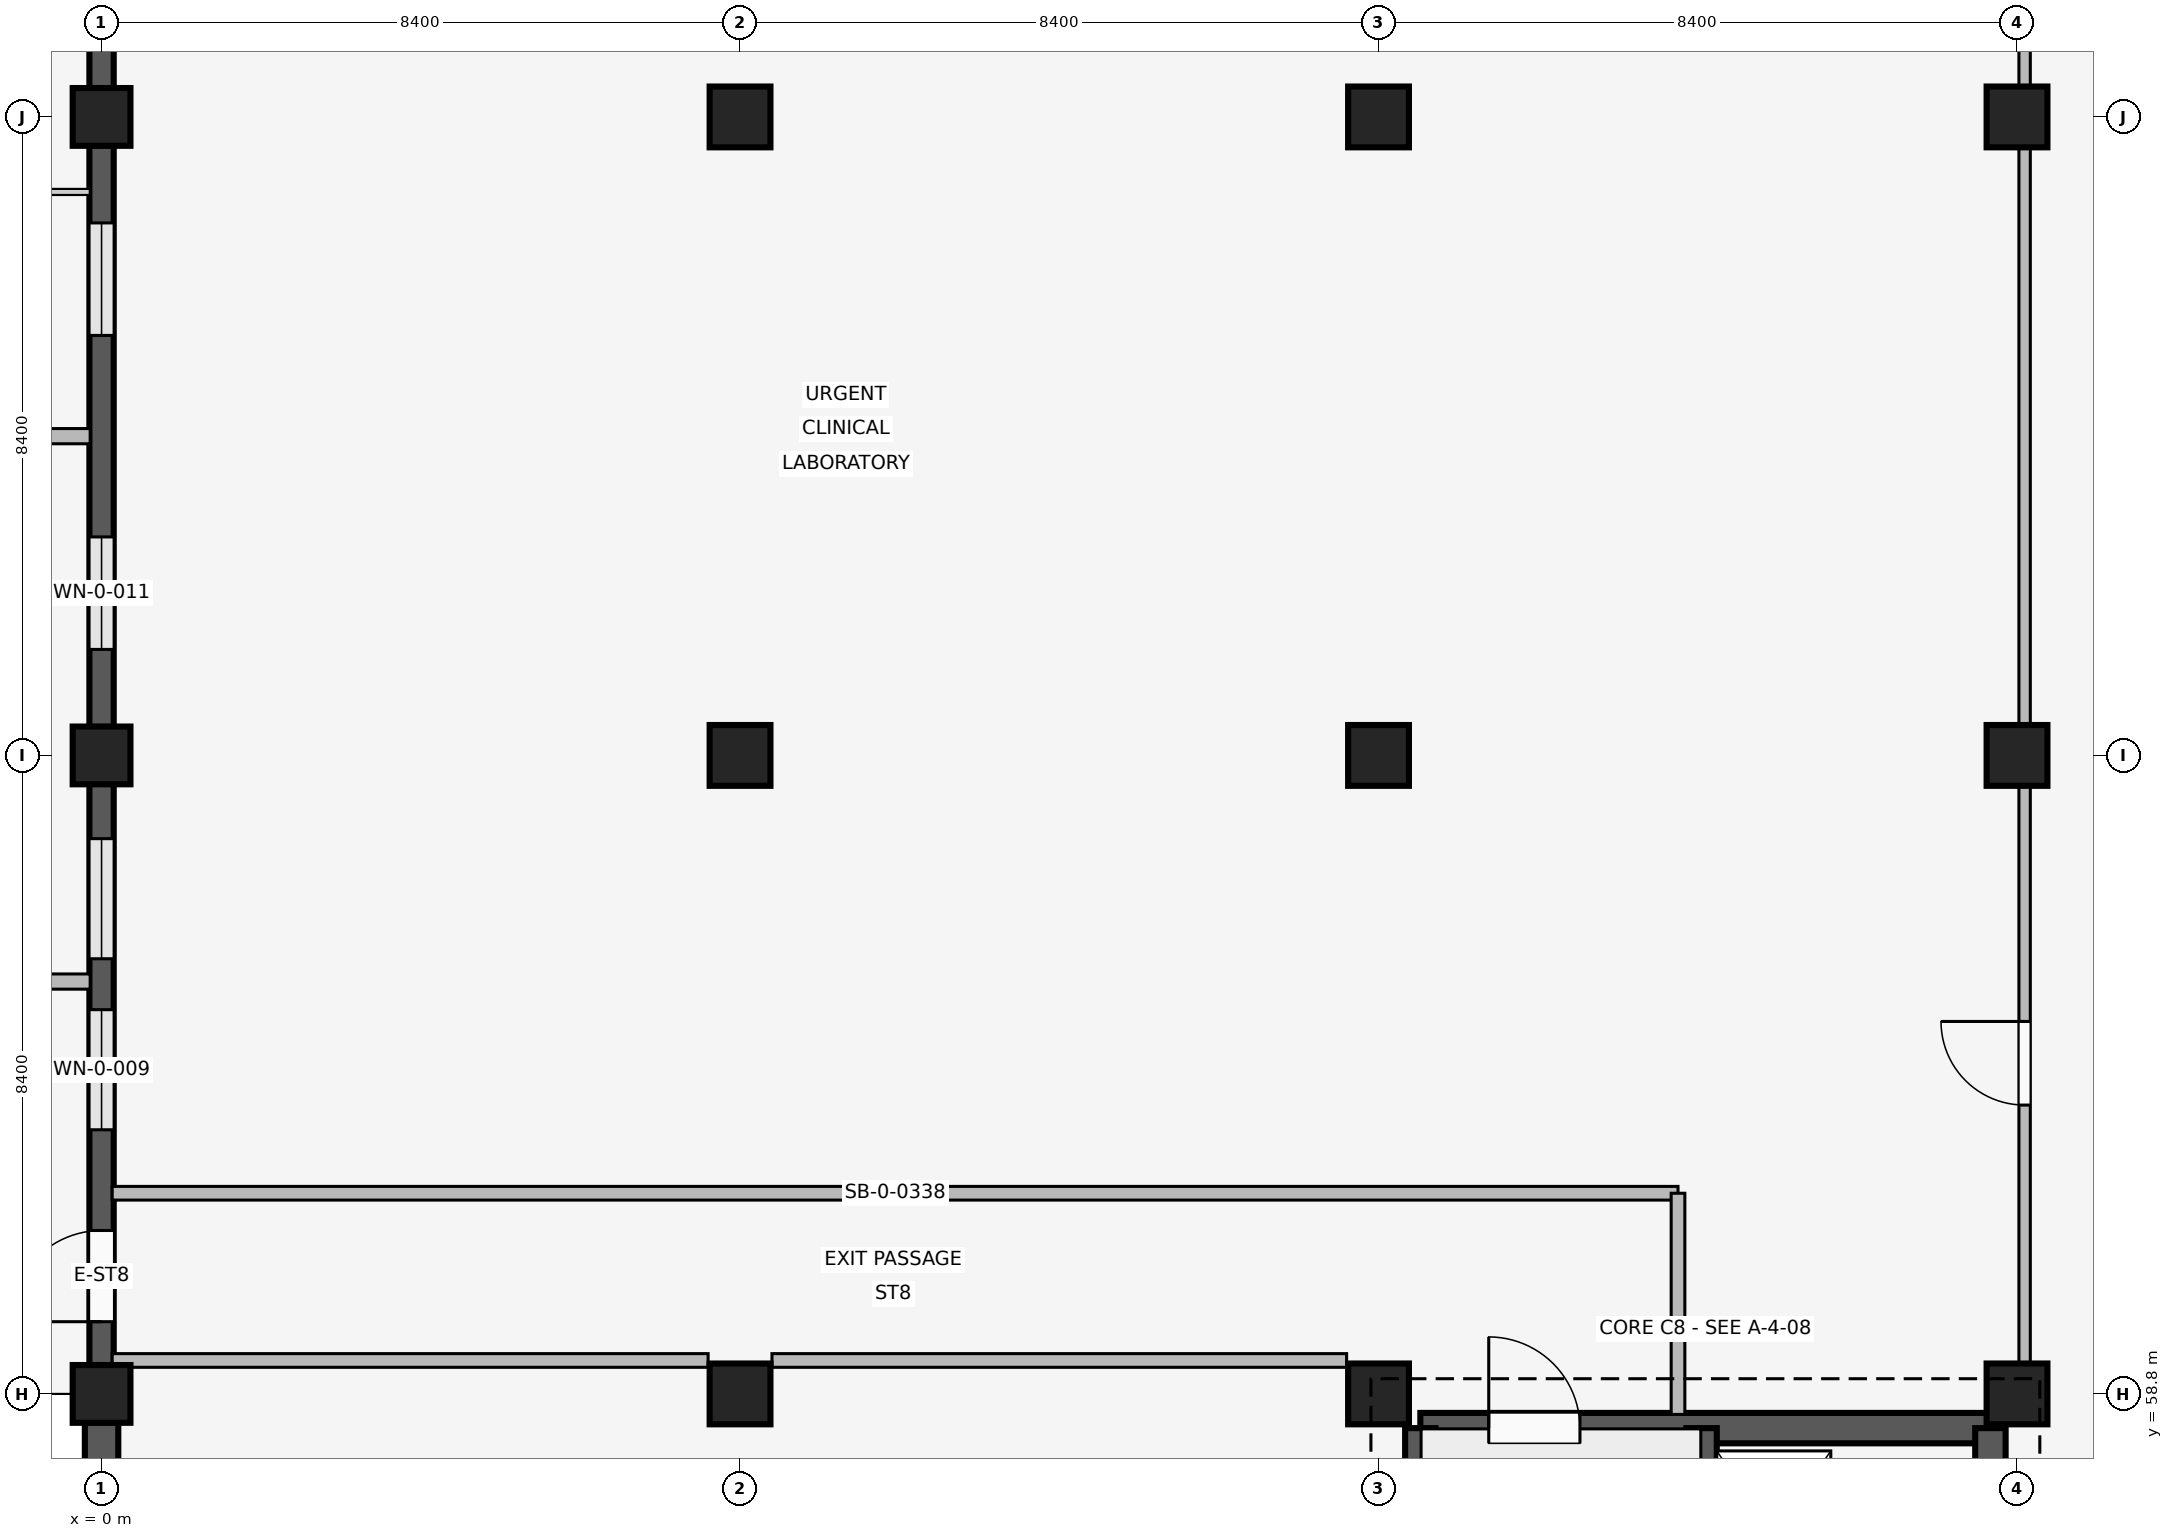
"""IFC4 building model, lengths in metres.
Left out: names, types, materials, properties, quantities, classifications, styles, units other than length and angle.
Written with IfcOpenShell. Run it as: python <this file> out.ifc"""

import sys

from ifc_helpers import new_model, si_unit, direction, frame, frame_2d, origin, origin_2d, place, context, subcontext, project, spatial, rectangle, extrude, element, fill, save


model = new_model("IFC4")
c1 = context("Model", 3, precision=1e-05, world=origin(), true_north=direction((0.0, 1.0)))
c2 = subcontext(c1, "Body", "Model", "MODEL_VIEW")
j1 = project(units=[si_unit("LENGTHUNIT", "METRE"), si_unit("PLANEANGLEUNIT", "RADIAN")], contexts=[c1])
p1 = place(None, origin())
s1 = spatial("IfcSite", under=j1, at=p1, CompositionType="ELEMENT")
p2 = place(p1, origin())
s2 = spatial("IfcBuilding", under=s1, at=p2, CompositionType="ELEMENT")
p3 = place(p2, origin())
s3 = spatial("IfcBuildingStorey", under=s2, at=p3, CompositionType="ELEMENT", Elevation=0.0)
for number, where, z_axis, x_axis in (
    (1, (0.0, 58.8, 0.0), (0.0, 0.0, 1.0), (1.0, 0.0, 0.0)),
    (2, (0.0, 67.2, 0.0), (0.0, 0.0, 1.0), (1.0, 0.0, 0.0)),
    (3, (0.0, 75.6, 0.0), (0.0, 0.0, 1.0), (1.0, 0.0, 0.0)),
):
    element("IfcColumn", number, at=place(p3, frame(where, z_axis=z_axis, x_axis=x_axis)), inside=s3, PredefinedType="COLUMN", context=c2, shape_type="SweptSolid", body=[
        extrude(rectangle(XDim=0.76, YDim=0.76, at=origin_2d()), origin(), (0.0, 0.0, 1.0), 4.8),
    ])
for number, where, z_axis, x_axis in (
    (4, (8.4, 58.8, 0.0), (0.0, 0.0, 1.0), (1.0, 0.0, 0.0)),
    (5, (8.4, 67.2, 0.0), (0.0, 0.0, 1.0), (1.0, 0.0, 0.0)),
    (6, (8.4, 75.6, 0.0), (0.0, 0.0, 1.0), (1.0, 0.0, 0.0)),
    (7, (16.8, 58.8, 0.0), (0.0, 0.0, 1.0), (1.0, 0.0, 0.0)),
    (8, (16.8, 67.2, 0.0), (0.0, 0.0, 1.0), (1.0, 0.0, 0.0)),
    (9, (16.8, 75.6, 0.0), (0.0, 0.0, 1.0), (1.0, 0.0, 0.0)),
    (10, (25.2, 58.8, 0.0), (0.0, 0.0, 1.0), (1.0, 0.0, 0.0)),
    (11, (25.2, 67.2, 0.0), (0.0, 0.0, 1.0), (1.0, 0.0, 0.0)),
    (12, (25.2, 75.6, 0.0), (0.0, 0.0, 1.0), (1.0, 0.0, 0.0)),
):
    element("IfcColumn", number, at=place(p3, frame(where, z_axis=z_axis, x_axis=x_axis)), inside=s3, PredefinedType="COLUMN", context=c2, shape_type="SweptSolid", body=[
        extrude(rectangle(XDim=0.8, YDim=0.8, at=origin_2d()), origin(), (0.0, 0.0, 1.0), 4.8),
    ])
p4 = place(p3, frame((0.0, 50.775, 0.0), z_axis=(0.0, 0.0, 1.0), x_axis=(0.0, 1.0, 0.0)))
e13 = element("IfcWall", 13, at=p4, inside=s3, PredefinedType="SOLIDWALL", context=c2, shape_type="SweptSolid", body=[
    extrude(rectangle(XDim=7.65, YDim=0.44, at=frame_2d((3.825, 0.0))), origin(), (0.0, 0.0, 1.0), 3.82),
])
p5 = place(p3, frame((0.0, 59.175, 0.0), z_axis=(0.0, 0.0, 1.0), x_axis=(0.0, 1.0, 0.0)))
e14 = element("IfcWall", 14, at=p5, inside=s3, PredefinedType="SOLIDWALL", context=c2, shape_type="SweptSolid", body=[
    extrude(rectangle(XDim=7.65, YDim=0.32, at=frame_2d((3.825, 0.0))), origin(), (0.0, 0.0, 1.0), 3.82),
])
p6 = place(p5, frame((0.575, 0.0, 0.0)))
e15 = element("IfcOpeningElement", 15, at=p6, cuts=e14, PredefinedType="OPENING", context=c2, shape_type="SweptSolid", body=[
    extrude(rectangle(XDim=1.2, YDim=2.25, at=frame_2d((0.6, 1.125))), frame((0.0, 0.17, 0.0), z_axis=(0.0, -1.0, 0.0), x_axis=(1.0, 0.0, 0.0)), (0.0, 0.0, 1.0), 0.34),
])
p7 = place(p5, frame((3.1, 0.0, 0.85)))
e16 = element("IfcOpeningElement", 16, at=p7, cuts=e14, PredefinedType="OPENING", context=c2, shape_type="SweptSolid", body=[
    extrude(rectangle(XDim=1.58, YDim=1.7, at=frame_2d((0.79, 0.85))), frame((0.0, 0.17, 0.0), z_axis=(0.0, -1.0, 0.0), x_axis=(1.0, 0.0, 0.0)), (0.0, 0.0, 1.0), 0.34),
])
p8 = place(p5, frame((5.35, 0.0, 0.85)))
e17 = element("IfcOpeningElement", 17, at=p8, cuts=e14, PredefinedType="OPENING", context=c2, shape_type="SweptSolid", body=[
    extrude(rectangle(XDim=1.58, YDim=1.7, at=frame_2d((0.79, 0.85))), frame((0.0, 0.17, 0.0), z_axis=(0.0, -1.0, 0.0), x_axis=(1.0, 0.0, 0.0)), (0.0, 0.0, 1.0), 0.34),
])
p9 = place(p3, frame((-0.15, 64.225, 0.0), z_axis=(0.0, 0.0, 1.0), x_axis=(-1.0, 0.0, 0.0)))
e18 = element("IfcWall", 18, at=p9, inside=s3, PredefinedType="ELEMENTEDWALL", context=c2, shape_type="SweptSolid", body=[
    extrude(rectangle(XDim=0.85, YDim=0.2, at=frame_2d((0.425, 0.0))), origin(), (0.0, 0.0, 1.0), 3.8),
])
p10 = place(p3, frame((0.0, 67.575, 0.0), z_axis=(0.0, 0.0, 1.0), x_axis=(0.0, 1.0, 0.0)))
e19 = element("IfcWall", 19, at=p10, inside=s3, PredefinedType="SOLIDWALL", context=c2, shape_type="SweptSolid", body=[
    extrude(rectangle(XDim=7.65, YDim=0.32, at=frame_2d((3.825, 0.0))), origin(), (0.0, 0.0, 1.0), 3.82),
])
p11 = place(p10, frame((1.02, 0.0, 0.85)))
e20 = element("IfcOpeningElement", 20, at=p11, cuts=e19, PredefinedType="OPENING", context=c2, shape_type="SweptSolid", body=[
    extrude(rectangle(XDim=1.48, YDim=1.6, at=frame_2d((0.74, 0.8))), frame((0.0, 0.17, 0.0), z_axis=(0.0, -1.0, 0.0), x_axis=(1.0, 0.0, 0.0)), (0.0, 0.0, 1.0), 0.34),
])
p12 = place(p10, frame((5.15, 0.0, 0.85)))
e21 = element("IfcOpeningElement", 21, at=p12, cuts=e19, PredefinedType="OPENING", context=c2, shape_type="SweptSolid", body=[
    extrude(rectangle(XDim=1.48, YDim=1.6, at=frame_2d((0.74, 0.8))), frame((0.0, 0.17, 0.0), z_axis=(0.0, -1.0, 0.0), x_axis=(1.0, 0.0, 0.0)), (0.0, 0.0, 1.0), 0.34),
])
p13 = place(p3, frame((-0.15, 71.4, 0.0), z_axis=(0.0, 0.0, 1.0), x_axis=(-1.0, 0.0, 0.0)))
e22 = element("IfcWall", 22, at=p13, inside=s3, PredefinedType="ELEMENTEDWALL", context=c2, shape_type="SweptSolid", body=[
    extrude(rectangle(XDim=0.85, YDim=0.2, at=frame_2d((0.425, 0.0))), origin(), (0.0, 0.0, 1.0), 3.8),
])
p14 = place(p3, frame((0.0, 75.975, 0.0), z_axis=(0.0, 0.0, 1.0), x_axis=(0.0, 1.0, 0.0)))
e23 = element("IfcWall", 23, at=p14, inside=s3, PredefinedType="SOLIDWALL", context=c2, shape_type="SweptSolid", body=[
    extrude(rectangle(XDim=7.65, YDim=0.32, at=frame_2d((3.825, 0.0))), origin(), (0.0, 0.0, 1.0), 3.82),
])
p15 = place(p14, frame((1.05, 0.0, 0.85)))
e24 = element("IfcOpeningElement", 24, at=p15, cuts=e23, PredefinedType="OPENING", context=c2, shape_type="SweptSolid", body=[
    extrude(rectangle(XDim=1.42, YDim=1.45, at=frame_2d((0.71, 0.725))), frame((0.0, 0.17, 0.0), z_axis=(0.0, -1.0, 0.0), x_axis=(1.0, 0.0, 0.0)), (0.0, 0.0, 1.0), 0.34),
])
p16 = place(p14, frame((5.18, 0.0, 0.85)))
e25 = element("IfcOpeningElement", 25, at=p16, cuts=e23, PredefinedType="OPENING", context=c2, shape_type="SweptSolid", body=[
    extrude(rectangle(XDim=1.42, YDim=1.45, at=frame_2d((0.71, 0.725))), frame((0.0, 0.17, 0.0), z_axis=(0.0, -1.0, 0.0), x_axis=(1.0, 0.0, 0.0)), (0.0, 0.0, 1.0), 0.34),
])
p17 = place(p3, frame((17.35, 58.35, 0.0), z_axis=(0.0, 0.0, 1.0), x_axis=(1.0, 0.0, 0.0)))
e26 = element("IfcWall", 26, at=p17, inside=s3, PredefinedType="SHEAR", context=c2, shape_type="SweptSolid", body=[
    extrude(rectangle(XDim=7.5, YDim=0.4, at=frame_2d((3.75, 0.0))), origin(), (0.0, 0.0, 1.0), 4.64),
])
p18 = place(p17, frame((0.9, 0.0, 0.0)))
e27 = element("IfcOpeningElement", 27, at=p18, cuts=e26, PredefinedType="OPENING", context=c2, shape_type="SweptSolid", body=[
    extrude(rectangle(XDim=1.2, YDim=2.1, at=frame_2d((0.6, 1.05))), frame((0.0, 0.21, 0.0), z_axis=(0.0, -1.0, 0.0), x_axis=(1.0, 0.0, 0.0)), (0.0, 0.0, 1.0), 0.42),
])
p19 = place(p3, frame((17.35, 50.8, 0.0), z_axis=(0.0, 0.0, 1.0), x_axis=(0.0, 1.0, 0.0)))
e28 = element("IfcWall", 28, at=p19, inside=s3, PredefinedType="SHEAR", context=c2, shape_type="SweptSolid", body=[
    extrude(rectangle(XDim=7.55, YDim=0.4, at=frame_2d((3.775, 0.0))), origin(), (0.0, 0.0, 1.0), 4.64),
])
p20 = place(p3, frame((24.85, 50.8, 0.0), z_axis=(0.0, 0.0, 1.0), x_axis=(0.0, 1.0, 0.0)))
e29 = element("IfcWall", 29, at=p20, inside=s3, PredefinedType="SHEAR", context=c2, shape_type="SweptSolid", body=[
    extrude(rectangle(XDim=7.55, YDim=0.4, at=frame_2d((3.775, 0.0))), origin(), (0.0, 0.0, 1.0), 4.64),
])
p21 = place(p20, frame((2.4, 0.0, 0.0)))
e30 = element("IfcOpeningElement", 30, at=p21, cuts=e29, PredefinedType="OPENING", context=c2, shape_type="SweptSolid", body=[
    extrude(rectangle(XDim=1.2, YDim=2.2, at=frame_2d((0.6, 1.1))), frame((0.0, 0.21, 0.0), z_axis=(0.0, -1.0, 0.0), x_axis=(1.0, 0.0, 0.0)), (0.0, 0.0, 1.0), 0.42),
])
p22 = place(p3, frame((21.05, 50.8, 0.0), z_axis=(0.0, 0.0, 1.0), x_axis=(0.0, 1.0, 0.0)))
e31 = element("IfcWall", 31, at=p22, inside=s3, PredefinedType="SHEAR", context=c2, shape_type="SweptSolid", body=[
    extrude(rectangle(XDim=7.55, YDim=0.4, at=frame_2d((3.775, 0.0))), origin(), (0.0, 0.0, 1.0), 4.64),
])
p23 = place(p22, frame((0.28, 0.0, 0.0)))
e32 = element("IfcOpeningElement", 32, at=p23, cuts=e31, PredefinedType="OPENING", context=c2, shape_type="SweptSolid", body=[
    extrude(rectangle(XDim=1.0, YDim=2.15, at=frame_2d((0.5, 1.075))), frame((0.0, 0.21, 0.0), z_axis=(0.0, -1.0, 0.0), x_axis=(1.0, 0.0, 0.0)), (0.0, 0.0, 1.0), 0.42),
])
p24 = place(p3, frame((25.3, 59.2, 0.0), z_axis=(0.0, 0.0, 1.0), x_axis=(0.0, 1.0, 0.0)))
e33 = element("IfcWall", 33, at=p24, inside=s3, PredefinedType="PARTITIONING", context=c2, shape_type="SweptSolid", body=[
    extrude(rectangle(XDim=16.0, YDim=0.15, at=frame_2d((8.0, 0.0))), origin(), (0.0, 0.0, 1.0), 3.8),
])
p25 = place(p24, frame((3.4, 0.0, 0.0)))
e34 = element("IfcOpeningElement", 34, at=p25, cuts=e33, PredefinedType="OPENING", context=c2, shape_type="SweptSolid", body=[
    extrude(rectangle(XDim=1.1, YDim=2.2, at=frame_2d((0.55, 1.1))), frame((0.0, 0.085, 0.0), z_axis=(0.0, -1.0, 0.0), x_axis=(1.0, 0.0, 0.0)), (0.0, 0.0, 1.0), 0.17),
])
p26 = place(p3, frame((25.3, 76.0, 0.0), z_axis=(0.0, 0.0, 1.0), x_axis=(0.0, 1.0, 0.0)))
e35 = element("IfcWall", 35, at=p26, inside=s3, PredefinedType="PARTITIONING", context=c2, shape_type="SweptSolid", body=[
    extrude(rectangle(XDim=16.0, YDim=0.15, at=frame_2d((8.0, 0.0))), origin(), (0.0, 0.0, 1.0), 3.8),
])
p27 = place(p26, frame((3.4, 0.0, 0.0)))
e36 = element("IfcOpeningElement", 36, at=p27, cuts=e35, PredefinedType="OPENING", context=c2, shape_type="SweptSolid", body=[
    extrude(rectangle(XDim=1.08, YDim=2.15, at=frame_2d((0.54, 1.075))), frame((0.0, 0.085, 0.0), z_axis=(0.0, -1.0, 0.0), x_axis=(1.0, 0.0, 0.0)), (0.0, 0.0, 1.0), 0.17),
])
p28 = place(p3, frame((0.14, 61.44, 0.0), z_axis=(0.0, 0.0, 1.0), x_axis=(1.0, 0.0, 0.0)))
e37 = element("IfcWall", 37, at=p28, inside=s3, PredefinedType="PARTITIONING", context=c2, shape_type="SweptSolid", body=[
    extrude(rectangle(XDim=20.6, YDim=0.18, at=frame_2d((10.3, 0.0))), origin(), (0.0, 0.0, 1.0), 3.8),
])
p29 = place(p3, frame((20.74, 58.53, 0.0), z_axis=(0.0, 0.0, 1.0), x_axis=(0.0, 1.0, 0.0)))
e38 = element("IfcWall", 38, at=p29, inside=s3, PredefinedType="PARTITIONING", context=c2, shape_type="SweptSolid", body=[
    extrude(rectangle(XDim=2.91, YDim=0.18, at=frame_2d((1.455, 0.0))), origin(), (0.0, 0.0, 1.0), 3.8),
])
p30 = place(p3, frame((0.14, 59.24, 0.0), z_axis=(0.0, 0.0, 1.0), x_axis=(1.0, 0.0, 0.0)))
e39 = element("IfcWall", 39, at=p30, inside=s3, PredefinedType="PARTITIONING", context=c2, shape_type="SweptSolid", body=[
    extrude(rectangle(XDim=7.84, YDim=0.18, at=frame_2d((3.92, 0.0))), origin(), (0.0, 0.0, 1.0), 3.8),
])
p31 = place(p3, frame((8.82, 59.24, 0.0), z_axis=(0.0, 0.0, 1.0), x_axis=(1.0, 0.0, 0.0)))
e40 = element("IfcWall", 40, at=p31, inside=s3, PredefinedType="PARTITIONING", context=c2, shape_type="SweptSolid", body=[
    extrude(rectangle(XDim=7.56, YDim=0.18, at=frame_2d((3.78, 0.0))), origin(), (0.0, 0.0, 1.0), 3.8),
])
p32 = place(p6, origin())
e41 = element("IfcDoor", 41, at=p32, inside=s3, OperationType="SINGLE_SWING_LEFT", PredefinedType="DOOR", context=c2, shape_type="SweptSolid", body=[
    extrude(rectangle(XDim=1.2, YDim=2.25, at=frame_2d((0.6, 1.125))), frame((0.0, 0.025, 0.0), z_axis=(0.0, -1.0, 0.0), x_axis=(1.0, 0.0, 0.0)), (0.0, 0.0, 1.0), 0.05),
])
fill(e15, e41)
p33 = place(p7, origin())
e42 = element("IfcWindow", 42, at=p33, inside=s3, PartitioningType="SINGLE_PANEL", PredefinedType="WINDOW", context=c2, shape_type="SweptSolid", body=[
    extrude(rectangle(XDim=1.58, YDim=1.7, at=frame_2d((0.79, 0.85))), frame((0.0, 0.03, 0.0), z_axis=(0.0, -1.0, 0.0), x_axis=(1.0, 0.0, 0.0)), (0.0, 0.0, 1.0), 0.06),
])
fill(e16, e42)
p34 = place(p8, origin())
e43 = element("IfcWindow", 43, at=p34, inside=s3, PartitioningType="SINGLE_PANEL", PredefinedType="WINDOW", context=c2, shape_type="SweptSolid", body=[
    extrude(rectangle(XDim=1.58, YDim=1.7, at=frame_2d((0.79, 0.85))), frame((0.0, 0.03, 0.0), z_axis=(0.0, -1.0, 0.0), x_axis=(1.0, 0.0, 0.0)), (0.0, 0.0, 1.0), 0.06),
])
fill(e17, e43)
p35 = place(p11, origin())
e44 = element("IfcWindow", 44, at=p35, inside=s3, PartitioningType="SINGLE_PANEL", PredefinedType="WINDOW", context=c2, shape_type="SweptSolid", body=[
    extrude(rectangle(XDim=1.48, YDim=1.6, at=frame_2d((0.74, 0.8))), frame((0.0, 0.03, 0.0), z_axis=(0.0, -1.0, 0.0), x_axis=(1.0, 0.0, 0.0)), (0.0, 0.0, 1.0), 0.06),
])
fill(e20, e44)
p36 = place(p12, origin())
e45 = element("IfcWindow", 45, at=p36, inside=s3, PartitioningType="SINGLE_PANEL", PredefinedType="WINDOW", context=c2, shape_type="SweptSolid", body=[
    extrude(rectangle(XDim=1.48, YDim=1.6, at=frame_2d((0.74, 0.8))), frame((0.0, 0.03, 0.0), z_axis=(0.0, -1.0, 0.0), x_axis=(1.0, 0.0, 0.0)), (0.0, 0.0, 1.0), 0.06),
])
fill(e21, e45)
p37 = place(p18, origin())
e46 = element("IfcDoor", 46, at=p37, inside=s3, OperationType="SINGLE_SWING_LEFT", PredefinedType="DOOR", context=c2, shape_type="SweptSolid", body=[
    extrude(rectangle(XDim=1.2, YDim=2.1, at=frame_2d((0.6, 1.05))), frame((0.0, 0.025, 0.0), z_axis=(0.0, -1.0, 0.0), x_axis=(1.0, 0.0, 0.0)), (0.0, 0.0, 1.0), 0.05),
])
fill(e27, e46)
p38 = place(p25, origin())
e47 = element("IfcDoor", 47, at=p38, inside=s3, OperationType="SINGLE_SWING_RIGHT", PredefinedType="DOOR", context=c2, shape_type="SweptSolid", body=[
    extrude(rectangle(XDim=1.1, YDim=2.2, at=frame_2d((0.55, 1.1))), frame((0.0, 0.025, 0.0), z_axis=(0.0, -1.0, 0.0), x_axis=(1.0, 0.0, 0.0)), (0.0, 0.0, 1.0), 0.05),
])
fill(e34, e47)
save(model, sys.argv[1])
